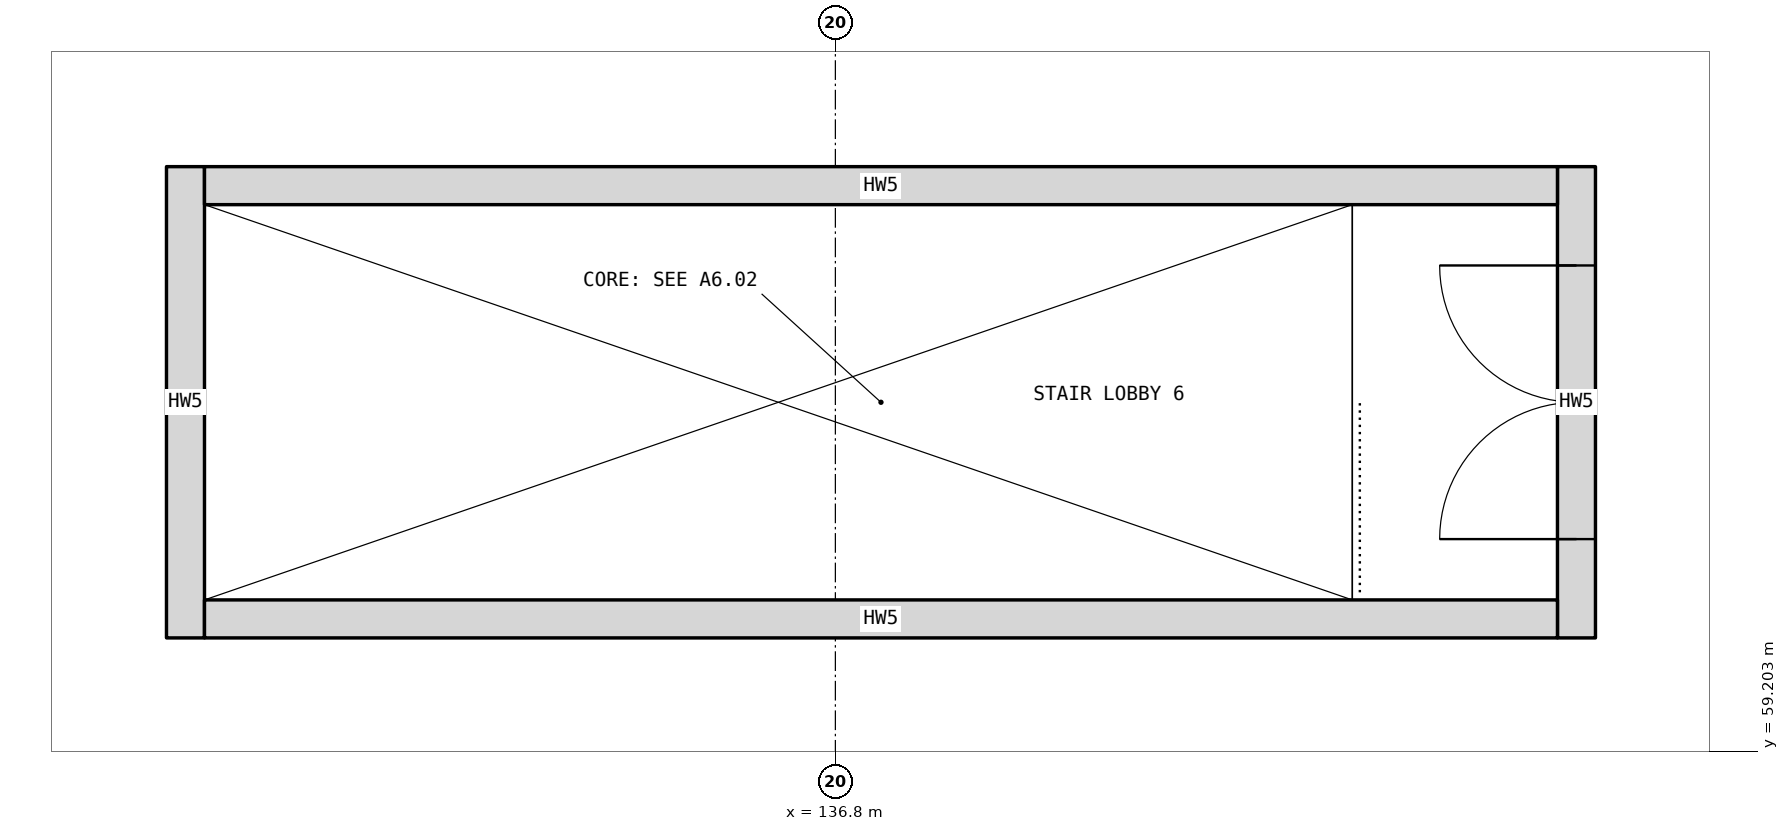
"""IFC4 building model, lengths in metres.
Left out: names, types, materials, properties, quantities, classifications, styles, units other than length and angle.
Written with IfcOpenShell. Run it as: python <this file> out.ifc"""

import sys

from ifc_helpers import new_model, si_unit, direction, frame, frame_2d, origin, place, context, subcontext, project, spatial, rectangle, extrude, element, fill, save


model = new_model("IFC4")
c1 = context("Model", 3, precision=1e-05, world=origin(), true_north=direction((0.0, 1.0)))
c2 = subcontext(c1, "Body", "Model", "MODEL_VIEW")
j1 = project(units=[si_unit("LENGTHUNIT", "METRE"), si_unit("PLANEANGLEUNIT", "RADIAN")], contexts=[c1])
p1 = place(None, origin())
s1 = spatial("IfcSite", under=j1, at=p1, CompositionType="ELEMENT")
p2 = place(p1, origin())
s2 = spatial("IfcBuilding", under=s1, at=p2, CompositionType="ELEMENT")
p3 = place(p2, origin())
s3 = spatial("IfcBuildingStorey", under=s2, at=p3, CompositionType="ELEMENT", Elevation=0.0)
p4 = place(p3, frame((132.525, 59.95, 0.0), z_axis=(0.0, 0.0, 1.0), x_axis=(0.0, 1.0, 0.0)))
e1 = element("IfcWall", 1, at=p4, inside=s3, PredefinedType="SOLIDWALL", context=c2, shape_type="SweptSolid", body=[
    extrude(rectangle(XDim=3.1, YDim=0.25, at=frame_2d((1.55, 0.0))), origin(), (0.0, 0.0, 1.0), 3.2),
])
p5 = place(p3, frame((141.675, 59.95, 0.0), z_axis=(0.0, 0.0, 1.0), x_axis=(0.0, 1.0, 0.0)))
e2 = element("IfcWall", 2, at=p5, inside=s3, PredefinedType="SOLIDWALL", context=c2, shape_type="SweptSolid", body=[
    extrude(rectangle(XDim=3.1, YDim=0.25, at=frame_2d((1.55, 0.0))), origin(), (0.0, 0.0, 1.0), 3.2),
])
p6 = place(p5, frame((0.65, 0.0, 0.0)))
e3 = element("IfcOpeningElement", 3, at=p6, cuts=e2, PredefinedType="OPENING", context=c2, shape_type="SweptSolid", body=[
    extrude(rectangle(XDim=1.8, YDim=2.1, at=frame_2d((0.9, 1.05))), frame((0.0, 0.135, 0.0), z_axis=(0.0, -1.0, 0.0), x_axis=(1.0, 0.0, 0.0)), (0.0, 0.0, 1.0), 0.27),
])
for number, where, z_axis, x_axis in (
    (4, (132.65, 60.075, 0.0), (0.0, 0.0, 1.0), (1.0, 0.0, 0.0)),
    (5, (132.65, 62.925, 0.0), (0.0, 0.0, 1.0), (1.0, 0.0, 0.0)),
):
    element("IfcWall", number, at=place(p3, frame(where, z_axis=z_axis, x_axis=x_axis)), inside=s3, PredefinedType="SOLIDWALL", context=c2, shape_type="SweptSolid", body=[
        extrude(rectangle(XDim=8.9, YDim=0.25, at=frame_2d((4.45, 0.0))), origin(), (0.0, 0.0, 1.0), 3.2),
    ])
p7 = place(p6, origin())
e6 = element("IfcDoor", 6, at=p7, inside=s3, OperationType="DOUBLE_DOOR_SINGLE_SWING", PredefinedType="DOOR", context=c2, shape_type="SweptSolid", body=[
    extrude(rectangle(XDim=1.8, YDim=2.1, at=frame_2d((0.9, 1.05))), frame((0.0, 0.025, 0.0), z_axis=(0.0, -1.0, 0.0), x_axis=(1.0, 0.0, 0.0)), (0.0, 0.0, 1.0), 0.05),
])
fill(e3, e6)
save(model, sys.argv[1])
